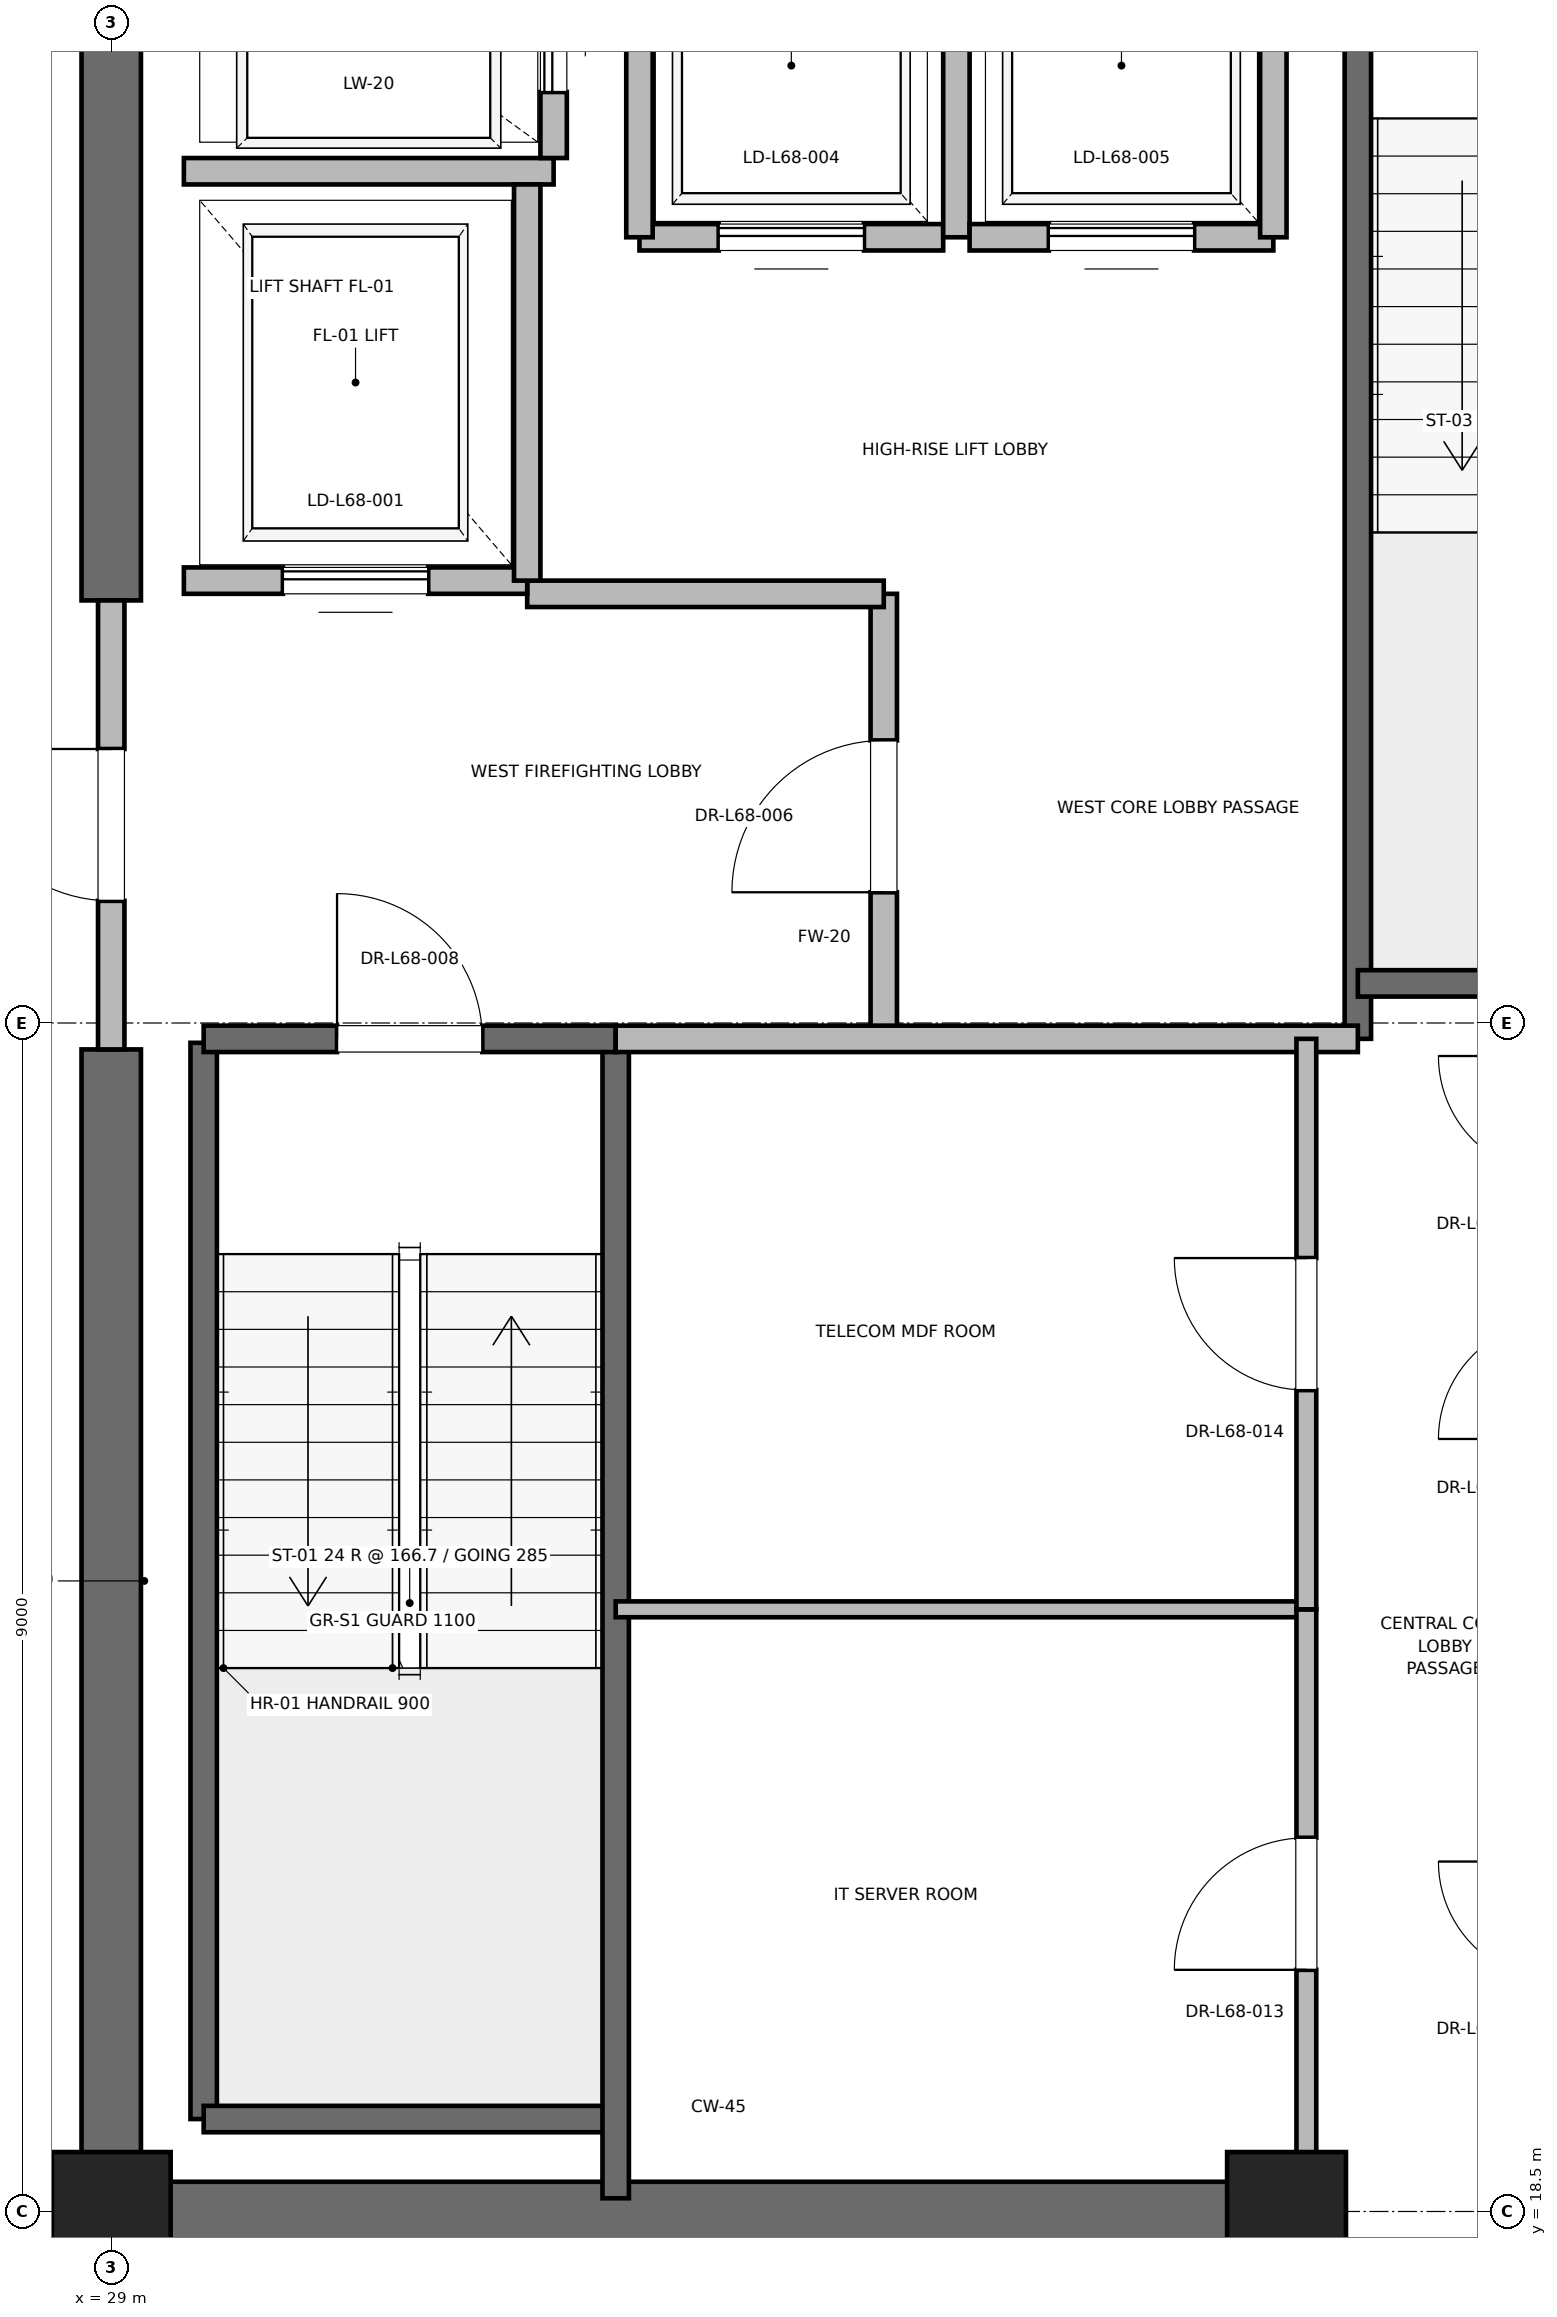
"""IFC4 building model, lengths in metres.
Left out: names, types, materials, properties, quantities, classifications, styles, units other than length and angle.
Written with IfcOpenShell. Run it as: python <this file> out.ifc"""

import sys

from ifc_helpers import new_model, si_unit, direction, frame, frame_2d, origin, origin_2d, place, context, subcontext, project, spatial, rectangle, extrude, element, fill, save


model = new_model("IFC4")
c1 = context("Model", 3, precision=1e-05, world=origin(), true_north=direction((0.0, 1.0)))
c2 = subcontext(c1, "Body", "Model", "MODEL_VIEW")
j1 = project(units=[si_unit("LENGTHUNIT", "METRE"), si_unit("PLANEANGLEUNIT", "RADIAN")], contexts=[c1])
p1 = place(None, origin())
s1 = spatial("IfcSite", under=j1, at=p1, CompositionType="ELEMENT")
p2 = place(p1, origin())
s2 = spatial("IfcBuilding", under=s1, at=p2, CompositionType="ELEMENT")
p3 = place(p2, frame((0.0, 0.0, 291.2)))
s3 = spatial("IfcBuildingStorey", under=s2, at=p3, CompositionType="ELEMENT", Elevation=291.2)
for number, where, z_axis, x_axis in (
    (1, (29.0, 18.5, 0.0), (0.0, 0.0, 1.0), (1.0, 0.0, 0.0)),
    (2, (37.9, 18.5, 0.0), (0.0, 0.0, 1.0), (1.0, 0.0, 0.0)),
):
    element("IfcColumn", number, at=place(p3, frame(where, z_axis=z_axis, x_axis=x_axis)), inside=s3, PredefinedType="PILASTER", context=c2, shape_type="SweptSolid", body=[
        extrude(rectangle(XDim=0.9, YDim=0.9, at=origin_2d()), origin(), (0.0, 0.0, 1.0), 4.0),
    ])
p4 = place(p3, frame((29.0, 18.5, 0.0), z_axis=(0.0, 0.0, 1.0), x_axis=(1.0, 0.0, 0.0)))
e3 = element("IfcWall", 3, at=p4, inside=s3, PredefinedType="SHEAR", context=c2, shape_type="SweptSolid", body=[
    extrude(rectangle(XDim=9.2, YDim=0.45, at=frame_2d((4.6, 0.0))), origin(), (0.0, 0.0, 1.0), 3.7),
])
p5 = place(p3, frame((29.0, 18.5, 0.0), z_axis=(0.0, 0.0, 1.0), x_axis=(0.0, 1.0, 0.0)))
e4 = element("IfcWall", 4, at=p5, inside=s3, PredefinedType="SHEAR", context=c2, shape_type="SweptSolid", body=[
    extrude(rectangle(XDim=8.8, YDim=0.45, at=frame_2d((4.4, 0.0))), origin(), (0.0, 0.0, 1.0), 3.7),
])
p6 = place(p3, frame((29.0, 30.7, 0.0), z_axis=(0.0, 0.0, 1.0), x_axis=(0.0, 1.0, 0.0)))
e5 = element("IfcWall", 5, at=p6, inside=s3, PredefinedType="SHEAR", context=c2, shape_type="SweptSolid", body=[
    extrude(rectangle(XDim=5.8, YDim=0.45, at=frame_2d((2.9, 0.0))), origin(), (0.0, 0.0, 1.0), 3.7),
])
p7 = place(p3, frame((29.7, 19.2, 0.0), z_axis=(0.0, 0.0, 1.0), x_axis=(0.0, 1.0, 0.0)))
e6 = element("IfcWall", 6, at=p7, inside=s3, PredefinedType="SOLIDWALL", context=c2, shape_type="SweptSolid", body=[
    extrude(rectangle(XDim=8.15, YDim=0.2, at=frame_2d((4.075, 0.0))), origin(), (0.0, 0.0, 1.0), 3.7),
])
p8 = place(p3, frame((29.7, 19.2, 0.0), z_axis=(0.0, 0.0, 1.0), x_axis=(1.0, 0.0, 0.0)))
e7 = element("IfcWall", 7, at=p8, inside=s3, PredefinedType="SOLIDWALL", context=c2, shape_type="SweptSolid", body=[
    extrude(rectangle(XDim=3.12, YDim=0.2, at=frame_2d((1.56, 0.0))), origin(), (0.0, 0.0, 1.0), 3.7),
])
p9 = place(p3, frame((32.82, 18.6, 0.0), z_axis=(0.0, 0.0, 1.0), x_axis=(0.0, 1.0, 0.0)))
e8 = element("IfcWall", 8, at=p9, inside=s3, PredefinedType="SOLIDWALL", context=c2, shape_type="SweptSolid", body=[
    extrude(rectangle(XDim=8.78, YDim=0.2, at=frame_2d((4.39, 0.0))), origin(), (0.0, 0.0, 1.0), 3.7),
])
p10 = place(p3, frame((29.7, 27.38, 0.0), z_axis=(0.0, 0.0, 1.0), x_axis=(1.0, 0.0, 0.0)))
e9 = element("IfcWall", 9, at=p10, inside=s3, PredefinedType="SOLIDWALL", context=c2, shape_type="SweptSolid", body=[
    extrude(rectangle(XDim=3.12, YDim=0.2, at=frame_2d((1.56, 0.0))), origin(), (0.0, 0.0, 1.0), 3.7),
])
p11 = place(p10, frame((1.01, 0.0, 0.0)))
e10 = element("IfcOpeningElement", 10, at=p11, cuts=e9, PredefinedType="OPENING", context=c2, shape_type="SweptSolid", body=[
    extrude(rectangle(XDim=1.1, YDim=2.15, at=frame_2d((0.55, 1.075))), frame((0.0, 0.1, 0.0), z_axis=(0.0, -1.0, 0.0), x_axis=(1.0, 0.0, 0.0)), (0.0, 0.0, 1.0), 0.2),
])
p12 = place(p3, frame((38.44, 27.38, 0.0), z_axis=(0.0, 0.0, 1.0), x_axis=(0.0, 1.0, 0.0)))
e11 = element("IfcWall", 11, at=p12, inside=s3, PredefinedType="SOLIDWALL", context=c2, shape_type="SweptSolid", body=[
    extrude(rectangle(XDim=8.87, YDim=0.2, at=frame_2d((4.435, 0.0))), origin(), (0.0, 0.0, 1.0), 3.7),
])
p13 = place(p3, frame((38.44, 27.8, 0.0), z_axis=(0.0, 0.0, 1.0), x_axis=(1.0, 0.0, 0.0)))
e12 = element("IfcWall", 12, at=p13, inside=s3, PredefinedType="SOLIDWALL", context=c2, shape_type="SweptSolid", body=[
    extrude(rectangle(XDim=3.32, YDim=0.2, at=frame_2d((1.66, 0.0))), origin(), (0.0, 0.0, 1.0), 3.7),
])
p14 = place(p3, frame((34.85, 27.38, 0.0), z_axis=(0.0, 0.0, 1.0), x_axis=(0.0, 1.0, 0.0)))
e13 = element("IfcWall", 13, at=p14, inside=s3, PredefinedType="PARTITIONING", context=c2, shape_type="SweptSolid", body=[
    extrude(rectangle(XDim=3.37, YDim=0.2, at=frame_2d((1.685, 0.0))), origin(), (0.0, 0.0, 1.0), 3.7),
])
p15 = place(p14, frame((1.11, 0.0, 0.0)))
e14 = element("IfcOpeningElement", 14, at=p15, cuts=e13, PredefinedType="OPENING", context=c2, shape_type="SweptSolid", body=[
    extrude(rectangle(XDim=1.15, YDim=2.2, at=frame_2d((0.575, 1.1))), frame((0.0, 0.1, 0.0), z_axis=(0.0, -1.0, 0.0), x_axis=(1.0, 0.0, 0.0)), (0.0, 0.0, 1.0), 0.2),
])
p16 = place(p3, frame((29.0, 27.3, 0.0), z_axis=(0.0, 0.0, 1.0), x_axis=(0.0, 1.0, 0.0)))
e15 = element("IfcWall", 15, at=p16, inside=s3, PredefinedType="PARTITIONING", context=c2, shape_type="SweptSolid", body=[
    extrude(rectangle(XDim=3.4, YDim=0.2, at=frame_2d((1.7, 0.0))), origin(), (0.0, 0.0, 1.0), 2.78),
])
p17 = place(p16, frame((1.125, 0.0, 0.0)))
e16 = element("IfcOpeningElement", 16, at=p17, cuts=e15, PredefinedType="OPENING", context=c2, shape_type="SweptSolid", body=[
    extrude(rectangle(XDim=1.15, YDim=2.2, at=frame_2d((0.575, 1.1))), frame((0.0, 0.1, 0.0), z_axis=(0.0, -1.0, 0.0), x_axis=(1.0, 0.0, 0.0)), (0.0, 0.0, 1.0), 0.2),
])
p18 = place(p3, frame((32.82, 27.38, 0.0), z_axis=(0.0, 0.0, 1.0), x_axis=(1.0, 0.0, 0.0)))
e17 = element("IfcWall", 17, at=p18, inside=s3, PredefinedType="PARTITIONING", context=c2, shape_type="SweptSolid", body=[
    extrude(rectangle(XDim=5.62, YDim=0.2, at=frame_2d((2.81, 0.0))), origin(), (0.0, 0.0, 1.0), 3.7),
])
p19 = place(p3, frame((32.15, 30.75, 0.0), z_axis=(0.0, 0.0, 1.0), x_axis=(1.0, 0.0, 0.0)))
e18 = element("IfcWall", 18, at=p19, inside=s3, PredefinedType="PARTITIONING", context=c2, shape_type="SweptSolid", body=[
    extrude(rectangle(XDim=2.7, YDim=0.2, at=frame_2d((1.35, 0.0))), origin(), (0.0, 0.0, 1.0), 3.7),
])
p20 = place(p3, frame((29.55, 30.85, 0.0), z_axis=(0.0, 0.0, 1.0), x_axis=(1.0, 0.0, 0.0)))
e19 = element("IfcWall", 19, at=p20, inside=s3, PredefinedType="SOLIDWALL", context=c2, shape_type="SweptSolid", body=[
    extrude(rectangle(XDim=2.6, YDim=0.2, at=frame_2d((1.3, 0.0))), origin(), (0.0, 0.0, 1.0), 2.78),
])
p21 = place(p20, frame((0.75, 0.0, 0.0)))
e20 = element("IfcOpeningElement", 20, at=p21, cuts=e19, PredefinedType="OPENING", context=c2, shape_type="SweptSolid", body=[
    extrude(rectangle(XDim=1.1, YDim=2.2, at=frame_2d((0.55, 1.1))), frame((0.0, 0.1, 0.0), z_axis=(0.0, -1.0, 0.0), x_axis=(1.0, 0.0, 0.0)), (0.0, 0.0, 1.0), 0.2),
])
p22 = place(p3, frame((29.55, 33.95, 0.0), z_axis=(0.0, 0.0, 1.0), x_axis=(1.0, 0.0, 0.0)))
e21 = element("IfcWall", 21, at=p22, inside=s3, PredefinedType="SOLIDWALL", context=c2, shape_type="SweptSolid", body=[
    extrude(rectangle(XDim=2.8, YDim=0.2, at=frame_2d((1.4, 0.0))), origin(), (0.0, 0.0, 1.0), 3.7),
])
p23 = place(p3, frame((32.15, 30.85, 0.0), z_axis=(0.0, 0.0, 1.0), x_axis=(0.0, 1.0, 0.0)))
e22 = element("IfcWall", 22, at=p23, inside=s3, PredefinedType="SOLIDWALL", context=c2, shape_type="SweptSolid", body=[
    extrude(rectangle(XDim=3.0, YDim=0.2, at=frame_2d((1.5, 0.0))), origin(), (0.0, 0.0, 1.0), 3.7),
])
p24 = place(p3, frame((32.35, 34.05, 0.0), z_axis=(0.0, 0.0, 1.0), x_axis=(0.0, 1.0, 0.0)))
e23 = element("IfcWall", 23, at=p24, inside=s3, PredefinedType="SOLIDWALL", context=c2, shape_type="SweptSolid", body=[
    extrude(rectangle(XDim=2.1, YDim=0.2, at=frame_2d((1.05, 0.0))), origin(), (0.0, 0.0, 1.0), 3.7),
])
p25 = place(p24, frame((0.5, 0.0, 0.0)))
e24 = element("IfcOpeningElement", 24, at=p25, cuts=e23, PredefinedType="OPENING", context=c2, shape_type="SweptSolid", body=[
    extrude(rectangle(XDim=1.1, YDim=2.2, at=frame_2d((0.55, 1.1))), frame((0.0, 0.1, 0.0), z_axis=(0.0, -1.0, 0.0), x_axis=(1.0, 0.0, 0.0)), (0.0, 0.0, 1.0), 0.2),
])
p26 = place(p3, frame((33.0, 33.45, 0.0), z_axis=(0.0, 0.0, 1.0), x_axis=(1.0, 0.0, 0.0)))
e25 = element("IfcWall", 25, at=p26, inside=s3, PredefinedType="SOLIDWALL", context=c2, shape_type="SweptSolid", body=[
    extrude(rectangle(XDim=2.3, YDim=0.2, at=frame_2d((1.15, 0.0))), origin(), (0.0, 0.0, 1.0), 3.7),
])
p27 = place(p26, frame((0.6, 0.0, 0.0)))
e26 = element("IfcOpeningElement", 26, at=p27, cuts=e25, PredefinedType="OPENING", context=c2, shape_type="SweptSolid", body=[
    extrude(rectangle(XDim=1.1, YDim=2.2, at=frame_2d((0.55, 1.1))), frame((0.0, 0.1, 0.0), z_axis=(0.0, -1.0, 0.0), x_axis=(1.0, 0.0, 0.0)), (0.0, 0.0, 1.0), 0.2),
])
p28 = place(p3, frame((33.0, 36.05, 0.0), z_axis=(0.0, 0.0, 1.0), x_axis=(0.0, -1.0, 0.0)))
e27 = element("IfcWall", 27, at=p28, inside=s3, PredefinedType="SOLIDWALL", context=c2, shape_type="SweptSolid", body=[
    extrude(rectangle(XDim=2.6, YDim=0.2, at=frame_2d((1.3, 0.0))), origin(), (0.0, 0.0, 1.0), 3.7),
])
p29 = place(p3, frame((35.4, 33.45, 0.0), z_axis=(0.0, 0.0, 1.0), x_axis=(0.0, 1.0, 0.0)))
e28 = element("IfcWall", 28, at=p29, inside=s3, PredefinedType="SOLIDWALL", context=c2, shape_type="SweptSolid", body=[
    extrude(rectangle(XDim=2.6, YDim=0.2, at=frame_2d((1.3, 0.0))), origin(), (0.0, 0.0, 1.0), 2.78),
])
p30 = place(p3, frame((35.5, 33.45, 0.0), z_axis=(0.0, 0.0, 1.0), x_axis=(1.0, 0.0, 0.0)))
e29 = element("IfcWall", 29, at=p30, inside=s3, PredefinedType="SOLIDWALL", context=c2, shape_type="SweptSolid", body=[
    extrude(rectangle(XDim=2.3, YDim=0.2, at=frame_2d((1.15, 0.0))), origin(), (0.0, 0.0, 1.0), 3.7),
])
p31 = place(p30, frame((0.6, 0.0, 0.0)))
e30 = element("IfcOpeningElement", 30, at=p31, cuts=e29, PredefinedType="OPENING", context=c2, shape_type="SweptSolid", body=[
    extrude(rectangle(XDim=1.1, YDim=2.2, at=frame_2d((0.55, 1.1))), frame((0.0, 0.1, 0.0), z_axis=(0.0, -1.0, 0.0), x_axis=(1.0, 0.0, 0.0)), (0.0, 0.0, 1.0), 0.2),
])
p32 = place(p3, frame((37.8, 33.45, 0.0), z_axis=(0.0, 0.0, 1.0), x_axis=(0.0, 1.0, 0.0)))
e31 = element("IfcWall", 31, at=p32, inside=s3, PredefinedType="SOLIDWALL", context=c2, shape_type="SweptSolid", body=[
    extrude(rectangle(XDim=2.6, YDim=0.2, at=frame_2d((1.3, 0.0))), origin(), (0.0, 0.0, 1.0), 2.78),
])
p33 = place(p3, frame((32.82, 23.06, 0.0), z_axis=(0.0, 0.0, 1.0), x_axis=(1.0, 0.0, 0.0)))
e32 = element("IfcWall", 32, at=p33, inside=s3, PredefinedType="PARTITIONING", context=c2, shape_type="SweptSolid", body=[
    extrude(rectangle(XDim=5.23, YDim=0.12, at=frame_2d((2.615, 0.0))), origin(), (0.0, 0.0, 1.0), 2.85),
])
p34 = place(p3, frame((38.05, 18.6, 0.0), z_axis=(0.0, 0.0, 1.0), x_axis=(0.0, 1.0, 0.0)))
e33 = element("IfcWall", 33, at=p34, inside=s3, PredefinedType="PARTITIONING", context=c2, shape_type="SweptSolid", body=[
    extrude(rectangle(XDim=4.46, YDim=0.15, at=frame_2d((2.23, 0.0))), origin(), (0.0, 0.0, 1.0), 2.78),
])
p35 = place(p34, frame((1.73, 0.0, 0.0)))
e34 = element("IfcOpeningElement", 34, at=p35, cuts=e33, PredefinedType="OPENING", context=c2, shape_type="SweptSolid", body=[
    extrude(rectangle(XDim=1.0, YDim=2.15, at=frame_2d((0.5, 1.075))), frame((0.0, 0.075, 0.0), z_axis=(0.0, -1.0, 0.0), x_axis=(1.0, 0.0, 0.0)), (0.0, 0.0, 1.0), 0.15),
])
p36 = place(p3, frame((38.05, 23.06, 0.0), z_axis=(0.0, 0.0, 1.0), x_axis=(0.0, 1.0, 0.0)))
e35 = element("IfcWall", 35, at=p36, inside=s3, PredefinedType="PARTITIONING", context=c2, shape_type="SweptSolid", body=[
    extrude(rectangle(XDim=4.32, YDim=0.15, at=frame_2d((2.16, 0.0))), origin(), (0.0, 0.0, 1.0), 2.85),
])
p37 = place(p36, frame((1.66, 0.0, 0.0)))
e36 = element("IfcOpeningElement", 36, at=p37, cuts=e35, PredefinedType="OPENING", context=c2, shape_type="SweptSolid", body=[
    extrude(rectangle(XDim=1.0, YDim=2.15, at=frame_2d((0.5, 1.075))), frame((0.0, 0.075, 0.0), z_axis=(0.0, -1.0, 0.0), x_axis=(1.0, 0.0, 0.0)), (0.0, 0.0, 1.0), 0.15),
])
p38 = place(p11, origin())
e37 = element("IfcDoor", 37, at=p38, inside=s3, OperationType="SINGLE_SWING_LEFT", PredefinedType="DOOR", context=c2, shape_type="SweptSolid", body=[
    extrude(rectangle(XDim=1.1, YDim=2.15, at=frame_2d((0.55, 1.075))), frame((0.0, 0.025, 0.0), z_axis=(0.0, -1.0, 0.0), x_axis=(1.0, 0.0, 0.0)), (0.0, 0.0, 1.0), 0.05),
])
fill(e10, e37)
p39 = place(p15, origin())
e38 = element("IfcDoor", 38, at=p39, inside=s3, OperationType="SINGLE_SWING_LEFT", PredefinedType="DOOR", context=c2, shape_type="SweptSolid", body=[
    extrude(rectangle(XDim=1.15, YDim=2.2, at=frame_2d((0.575, 1.1))), frame((0.0, 0.025, 0.0), z_axis=(0.0, -1.0, 0.0), x_axis=(1.0, 0.0, 0.0)), (0.0, 0.0, 1.0), 0.05),
])
fill(e14, e38)
p40 = place(p17, origin())
e39 = element("IfcDoor", 39, at=p40, inside=s3, OperationType="SINGLE_SWING_RIGHT", PredefinedType="DOOR", context=c2, shape_type="SweptSolid", body=[
    extrude(rectangle(XDim=1.15, YDim=2.2, at=frame_2d((0.575, 1.1))), frame((0.0, 0.025, 0.0), z_axis=(0.0, -1.0, 0.0), x_axis=(1.0, 0.0, 0.0)), (0.0, 0.0, 1.0), 0.05),
])
fill(e16, e39)
p41 = place(p21, origin())
e40 = element("IfcDoor", 40, at=p41, inside=s3, OperationType="SLIDING_TO_RIGHT", PredefinedType="DOOR", context=c2, shape_type="SweptSolid", body=[
    extrude(rectangle(XDim=1.1, YDim=2.2, at=frame_2d((0.55, 1.1))), frame((0.0, 0.025, 0.0), z_axis=(0.0, -1.0, 0.0), x_axis=(1.0, 0.0, 0.0)), (0.0, 0.0, 1.0), 0.05),
])
fill(e20, e40)
p42 = place(p25, origin())
e41 = element("IfcDoor", 41, at=p42, inside=s3, OperationType="SLIDING_TO_RIGHT", PredefinedType="DOOR", context=c2, shape_type="SweptSolid", body=[
    extrude(rectangle(XDim=1.1, YDim=2.2, at=frame_2d((0.55, 1.1))), frame((0.0, 0.025, 0.0), z_axis=(0.0, -1.0, 0.0), x_axis=(1.0, 0.0, 0.0)), (0.0, 0.0, 1.0), 0.05),
])
fill(e24, e41)
p43 = place(p27, origin())
e42 = element("IfcDoor", 42, at=p43, inside=s3, OperationType="SLIDING_TO_RIGHT", PredefinedType="DOOR", context=c2, shape_type="SweptSolid", body=[
    extrude(rectangle(XDim=1.1, YDim=2.2, at=frame_2d((0.55, 1.1))), frame((0.0, 0.025, 0.0), z_axis=(0.0, -1.0, 0.0), x_axis=(1.0, 0.0, 0.0)), (0.0, 0.0, 1.0), 0.05),
])
fill(e26, e42)
p44 = place(p31, origin())
e43 = element("IfcDoor", 43, at=p44, inside=s3, OperationType="SLIDING_TO_RIGHT", PredefinedType="DOOR", context=c2, shape_type="SweptSolid", body=[
    extrude(rectangle(XDim=1.1, YDim=2.2, at=frame_2d((0.55, 1.1))), frame((0.0, 0.025, 0.0), z_axis=(0.0, -1.0, 0.0), x_axis=(1.0, 0.0, 0.0)), (0.0, 0.0, 1.0), 0.05),
])
fill(e30, e43)
p45 = place(p35, origin())
e44 = element("IfcDoor", 44, at=p45, inside=s3, OperationType="SINGLE_SWING_LEFT", PredefinedType="DOOR", context=c2, shape_type="SweptSolid", body=[
    extrude(rectangle(XDim=1.0, YDim=2.15, at=frame_2d((0.5, 1.075))), frame((0.0, 0.025, 0.0), z_axis=(0.0, -1.0, 0.0), x_axis=(1.0, 0.0, 0.0)), (0.0, 0.0, 1.0), 0.05),
])
fill(e34, e44)
p46 = place(p37, origin())
e45 = element("IfcDoor", 45, at=p46, inside=s3, OperationType="SINGLE_SWING_RIGHT", PredefinedType="DOOR", context=c2, shape_type="SweptSolid", body=[
    extrude(rectangle(XDim=1.0, YDim=2.15, at=frame_2d((0.5, 1.075))), frame((0.0, 0.025, 0.0), z_axis=(0.0, -1.0, 0.0), x_axis=(1.0, 0.0, 0.0)), (0.0, 0.0, 1.0), 0.05),
])
fill(e36, e45)
save(model, sys.argv[1])
